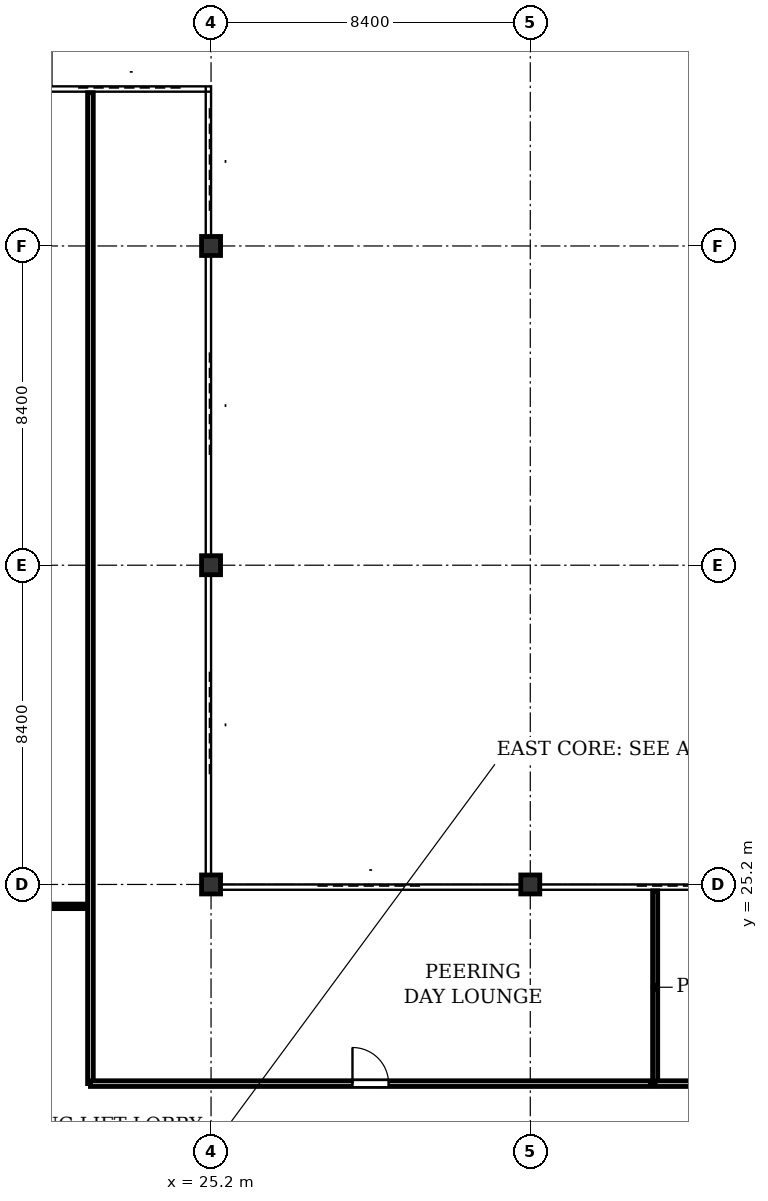
"""IFC4 building model, lengths in metres.
Left out: names, types, materials, properties, quantities, classifications, styles, units other than length and angle.
Written with IfcOpenShell. Run it as: python <this file> out.ifc"""

import sys

from ifc_helpers import new_model, si_unit, direction, frame, frame_2d, origin, origin_2d, place, context, subcontext, project, spatial, rectangle, i_section, extrude, element, fill, save


model = new_model("IFC4")
c1 = context("Model", 3, precision=1e-05, world=origin(), true_north=direction((0.0, 1.0)))
c2 = subcontext(c1, "Body", "Model", "MODEL_VIEW")
j1 = project(units=[si_unit("LENGTHUNIT", "METRE"), si_unit("PLANEANGLEUNIT", "RADIAN")], contexts=[c1])
p1 = place(None, origin())
s1 = spatial("IfcSite", under=j1, at=p1, CompositionType="ELEMENT")
p2 = place(p1, origin())
s2 = spatial("IfcBuilding", under=s1, at=p2, CompositionType="ELEMENT")
p3 = place(p2, frame((0.0, 0.0, 62.6)))
s3 = spatial("IfcBuildingStorey", under=s2, at=p3, CompositionType="ELEMENT", Elevation=62.6)
for number, where, z_axis, x_axis in (
    (1, (25.2, 25.2, 0.0), (0.0, 0.0, 1.0), (1.0, 0.0, 0.0)),
    (2, (25.2, 33.6, 0.0), (0.0, 0.0, 1.0), (1.0, 0.0, 0.0)),
    (3, (25.2, 42.0, 0.0), (0.0, 0.0, 1.0), (1.0, 0.0, 0.0)),
    (4, (33.6, 25.2, 0.0), (0.0, 0.0, 1.0), (1.0, 0.0, 0.0)),
):
    element("IfcColumn", number, at=place(p3, frame(where, z_axis=z_axis, x_axis=x_axis)), inside=s3, PredefinedType="COLUMN", context=c2, shape_type="SweptSolid", body=[
        extrude(i_section(OverallWidth=0.5, OverallDepth=0.5, WebThickness=0.028, FlangeThickness=0.04, at=origin_2d()), origin(), (0.0, 0.0, 1.0), 4.2),
    ])
p4 = place(p3, frame((36.886, 25.031, 0.0), z_axis=(0.0, 0.0, 1.0), x_axis=(0.0, -1.0, 0.0)))
e5 = element("IfcWall", 5, at=p4, inside=s3, PredefinedType="PARTITIONING", context=c2, shape_type="SweptSolid", body=[
    extrude(rectangle(XDim=5.071, YDim=0.135, at=frame_2d((2.536, 0.0))), origin(), (0.0, 0.0, 1.0), 3.925),
])
p5 = place(p3, frame((36.886, 19.96, 0.0), z_axis=(0.0, 0.0, 1.0), x_axis=(1.0, 0.0, 0.0)))
e6 = element("IfcWall", 6, at=p5, inside=s3, PredefinedType="PARTITIONING", context=c2, shape_type="SweptSolid", body=[
    extrude(rectangle(XDim=7.607, YDim=0.15, at=frame_2d((3.804, 0.0))), origin(), (0.0, 0.0, 1.0), 3.323),
])
p6 = place(p5, frame((3.329, 0.0, 0.0)))
e7 = element("IfcOpeningElement", 7, at=p6, cuts=e6, PredefinedType="OPENING", context=c2, shape_type="SweptSolid", body=[
    extrude(rectangle(XDim=0.95, YDim=2.15, at=frame_2d((0.475, 1.075))), frame((0.0, 0.085, 0.0), z_axis=(0.0, -1.0, 0.0), x_axis=(1.0, 0.0, 0.0)), (0.0, 0.0, 1.0), 0.17),
])
p7 = place(p3, frame((22.026, 46.031, 0.0), z_axis=(0.0, 0.0, 1.0), x_axis=(0.0, -1.0, 0.0)))
e8 = element("IfcWall", 8, at=p7, inside=s3, PredefinedType="PARTITIONING", context=c2, shape_type="SweptSolid", body=[
    extrude(rectangle(XDim=26.071, YDim=0.15, at=frame_2d((13.036, 0.0))), origin(), (0.0, 0.0, 1.0), 3.313),
])
p8 = place(p3, frame((22.026, 19.96, 0.0), z_axis=(0.0, 0.0, 1.0), x_axis=(0.999999999863, -1.6562598e-05, 0.0)))
e9 = element("IfcWall", 9, at=p8, inside=s3, PredefinedType="PARTITIONING", context=c2, shape_type="SweptSolid", body=[
    extrude(rectangle(XDim=14.74, YDim=0.15, at=frame_2d((7.37, 0.0))), origin(), (0.0, 0.0, 1.0), 3.323),
])
p9 = place(p8, frame((6.895, 0.0, 0.0)))
e10 = element("IfcOpeningElement", 10, at=p9, cuts=e9, PredefinedType="OPENING", context=c2, shape_type="SweptSolid", body=[
    extrude(rectangle(XDim=0.95, YDim=2.15, at=frame_2d((0.475, 1.075))), frame((0.0, 0.085, 0.0), z_axis=(0.0, -1.0, 0.0), x_axis=(1.0, 0.0, 0.0)), (0.0, 0.0, 1.0), 0.17),
])
p10 = place(p3, frame((19.96, 24.624, 0.0), z_axis=(0.0, 0.0, 1.0), x_axis=(1.0, 0.0, 0.0)))
e11 = element("IfcWall", 11, at=p10, inside=s3, PredefinedType="PARTITIONING", context=c2, shape_type="SweptSolid", body=[
    extrude(rectangle(XDim=1.987, YDim=0.12, at=frame_2d((0.994, 0.0))), origin(), (0.0, 0.0, 1.0), 3.566),
])
p11 = place(p9, origin())
e12 = element("IfcDoor", 12, at=p11, inside=s3, OperationType="SINGLE_SWING_LEFT", PredefinedType="DOOR", context=c2, shape_type="SweptSolid", body=[
    extrude(rectangle(XDim=0.95, YDim=2.15, at=frame_2d((0.475, 1.075))), frame((0.0, 0.025, 0.0), z_axis=(0.0, -1.0, 0.0), x_axis=(1.0, 0.0, 0.0)), (0.0, 0.0, 1.0), 0.05),
])
fill(e10, e12)
save(model, sys.argv[1])
